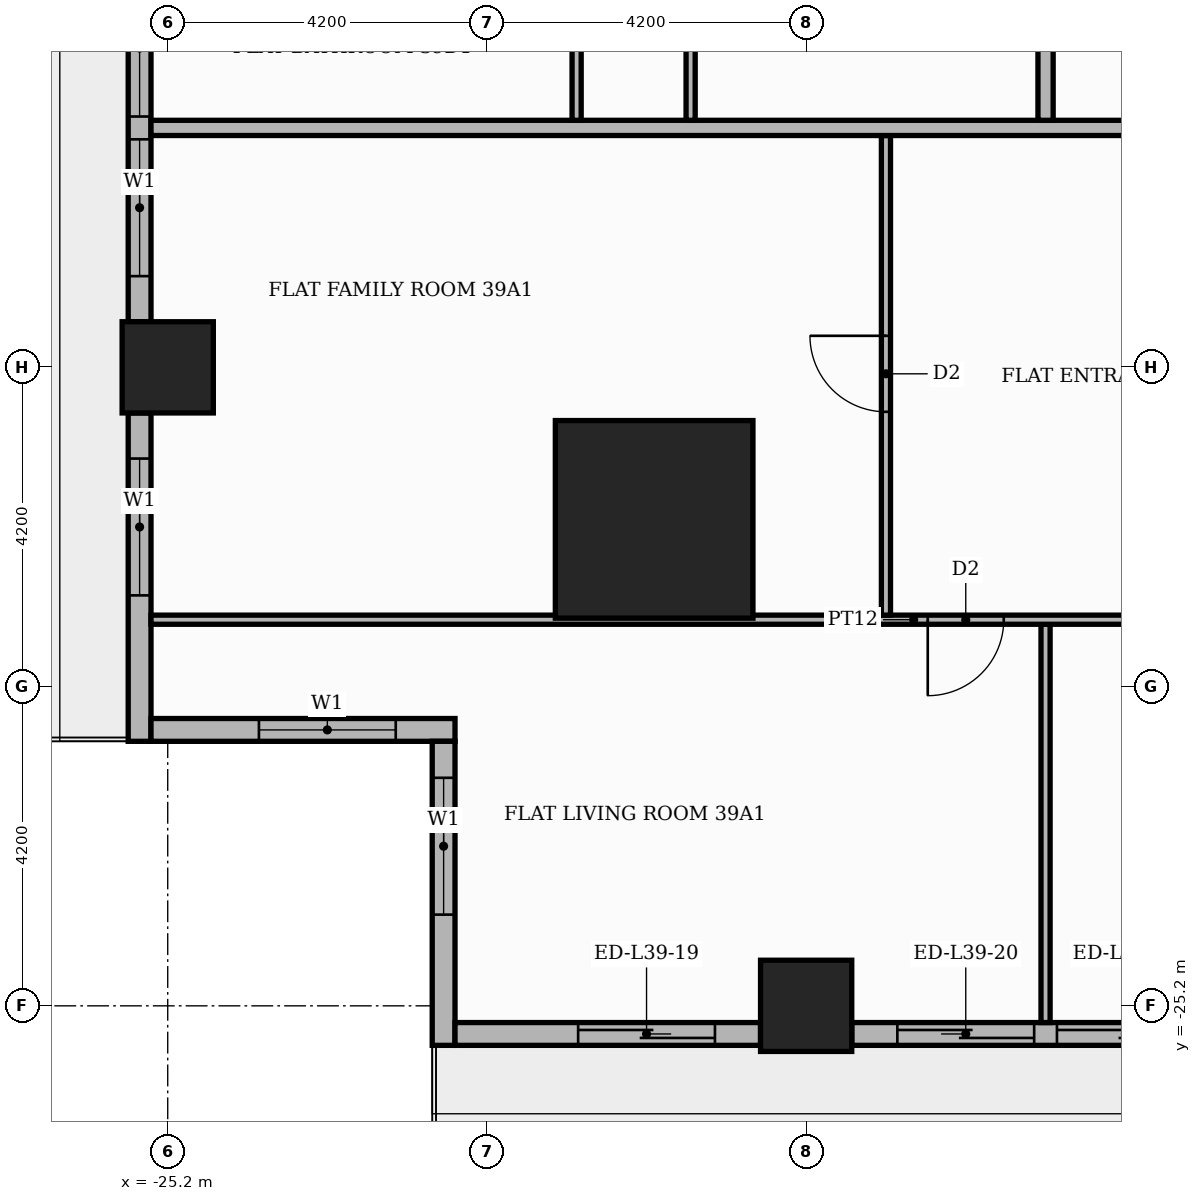
"""IFC4 building model, lengths in metres.
Left out: names, types, materials, properties, quantities, classifications, styles, units other than length and angle.
Written with IfcOpenShell. Run it as: python <this file> out.ifc"""

import sys

from ifc_helpers import new_model, si_unit, direction, frame, frame_2d, origin, origin_2d, place, context, subcontext, project, spatial, rectangle, extrude, element, fill, save


model = new_model("IFC4")
c1 = context("Model", 3, precision=1e-05, world=origin(), true_north=direction((0.0, 1.0)))
c2 = subcontext(c1, "Body", "Model", "MODEL_VIEW")
j1 = project(units=[si_unit("LENGTHUNIT", "METRE"), si_unit("PLANEANGLEUNIT", "RADIAN")], contexts=[c1])
p1 = place(None, origin())
s1 = spatial("IfcSite", under=j1, at=p1, CompositionType="ELEMENT")
p2 = place(p1, origin())
s2 = spatial("IfcBuilding", under=s1, at=p2, CompositionType="ELEMENT")
p3 = place(p2, frame((0.0, 0.0, 165.0)))
s3 = spatial("IfcBuildingStorey", under=s2, at=p3, CompositionType="ELEMENT", Elevation=165.0)
p4 = place(p3, frame((-18.8, -18.8, 0.0), z_axis=(0.0, 0.0, 1.0), x_axis=(1.0, 0.0, 0.0)))
e1 = element("IfcColumn", 1, at=p4, inside=s3, PredefinedType="COLUMN", context=c2, shape_type="SweptSolid", body=[
    extrude(rectangle(XDim=2.6, YDim=2.6, at=origin_2d()), origin(), (0.0, 0.0, 1.0), 3.9),
])
for number, where, z_axis, x_axis in (
    (2, (-16.8, -25.2, 0.0), (0.0, 0.0, 1.0), (1.0, 0.0, 0.0)),
    (3, (-25.2, -16.8, 0.0), (0.0, 0.0, 1.0), (1.0, 0.0, 0.0)),
):
    element("IfcColumn", number, at=place(p3, frame(where, z_axis=z_axis, x_axis=x_axis)), inside=s3, PredefinedType="COLUMN", context=c2, shape_type="SweptSolid", body=[
        extrude(rectangle(XDim=1.2, YDim=1.2, at=origin_2d()), origin(), (0.0, 0.0, 1.0), 3.9),
    ])
p5 = place(p3, frame((-25.57, -9.0, 0.0), z_axis=(0.0, 0.0, 1.0), x_axis=(0.0, -1.0, 0.0)))
e4 = element("IfcWall", 4, at=p5, inside=s3, PredefinedType="STANDARD", context=c2, shape_type="SweptSolid", body=[
    extrude(rectangle(XDim=7.2, YDim=0.3, at=frame_2d((3.6, 0.0))), origin(), (0.0, 0.0, 1.0), 3.48),
])
p6 = place(p5, frame((0.6, 0.0, 0.9)))
e5 = element("IfcOpeningElement", 5, at=p6, cuts=e4, PredefinedType="OPENING", context=c2, shape_type="SweptSolid", body=[
    extrude(rectangle(XDim=1.8, YDim=2.1, at=frame_2d((0.9, 1.05))), frame((0.0, 0.16, 0.0), z_axis=(0.0, -1.0, 0.0), x_axis=(1.0, 0.0, 0.0)), (0.0, 0.0, 1.0), 0.32),
])
p7 = place(p5, frame((2.7, 0.0, 0.9)))
e6 = element("IfcOpeningElement", 6, at=p7, cuts=e4, PredefinedType="OPENING", context=c2, shape_type="SweptSolid", body=[
    extrude(rectangle(XDim=1.8, YDim=2.1, at=frame_2d((0.9, 1.05))), frame((0.0, 0.16, 0.0), z_axis=(0.0, -1.0, 0.0), x_axis=(1.0, 0.0, 0.0)), (0.0, 0.0, 1.0), 0.32),
])
p8 = place(p5, frame((4.8, 0.0, 0.9)))
e7 = element("IfcOpeningElement", 7, at=p8, cuts=e4, PredefinedType="OPENING", context=c2, shape_type="SweptSolid", body=[
    extrude(rectangle(XDim=1.8, YDim=2.1, at=frame_2d((0.9, 1.05))), frame((0.0, 0.16, 0.0), z_axis=(0.0, -1.0, 0.0), x_axis=(1.0, 0.0, 0.0)), (0.0, 0.0, 1.0), 0.32),
])
p9 = place(p3, frame((-25.57, -17.4, 0.0), z_axis=(0.0, 0.0, 1.0), x_axis=(0.0, -1.0, 0.0)))
e8 = element("IfcWall", 8, at=p9, inside=s3, PredefinedType="STANDARD", context=c2, shape_type="SweptSolid", body=[
    extrude(rectangle(XDim=4.32, YDim=0.3, at=frame_2d((2.16, 0.0))), origin(), (0.0, 0.0, 1.0), 3.48),
])
p10 = place(p9, frame((0.6, 0.0, 0.9)))
e9 = element("IfcOpeningElement", 9, at=p10, cuts=e8, PredefinedType="OPENING", context=c2, shape_type="SweptSolid", body=[
    extrude(rectangle(XDim=1.8, YDim=2.1, at=frame_2d((0.9, 1.05))), frame((0.0, 0.16, 0.0), z_axis=(0.0, -1.0, 0.0), x_axis=(1.0, 0.0, 0.0)), (0.0, 0.0, 1.0), 0.32),
])
p11 = place(p3, frame((-25.42, -21.57, 0.0), z_axis=(0.0, 0.0, 1.0), x_axis=(1.0, 0.0, 0.0)))
e10 = element("IfcWall", 10, at=p11, inside=s3, PredefinedType="STANDARD", context=c2, shape_type="SweptSolid", body=[
    extrude(rectangle(XDim=4.0, YDim=0.3, at=frame_2d((2.0, 0.0))), origin(), (0.0, 0.0, 1.0), 3.48),
])
p12 = place(p11, frame((1.42, 0.0, 0.9)))
e11 = element("IfcOpeningElement", 11, at=p12, cuts=e10, PredefinedType="OPENING", context=c2, shape_type="SweptSolid", body=[
    extrude(rectangle(XDim=1.8, YDim=2.1, at=frame_2d((0.9, 1.05))), frame((0.0, 0.16, 0.0), z_axis=(0.0, -1.0, 0.0), x_axis=(1.0, 0.0, 0.0)), (0.0, 0.0, 1.0), 0.32),
])
p13 = place(p3, frame((-21.57, -21.72, 0.0), z_axis=(0.0, 0.0, 1.0), x_axis=(0.0, -1.0, 0.0)))
e12 = element("IfcWall", 12, at=p13, inside=s3, PredefinedType="STANDARD", context=c2, shape_type="SweptSolid", body=[
    extrude(rectangle(XDim=4.0, YDim=0.3, at=frame_2d((2.0, 0.0))), origin(), (0.0, 0.0, 1.0), 3.48),
])
p14 = place(p13, frame((0.48, 0.0, 0.9)))
e13 = element("IfcOpeningElement", 13, at=p14, cuts=e12, PredefinedType="OPENING", context=c2, shape_type="SweptSolid", body=[
    extrude(rectangle(XDim=1.8, YDim=2.1, at=frame_2d((0.9, 1.05))), frame((0.0, 0.16, 0.0), z_axis=(0.0, -1.0, 0.0), x_axis=(1.0, 0.0, 0.0)), (0.0, 0.0, 1.0), 0.32),
])
p15 = place(p3, frame((-21.42, -25.57, 0.0), z_axis=(0.0, 0.0, 1.0), x_axis=(1.0, 0.0, 0.0)))
e14 = element("IfcWall", 14, at=p15, inside=s3, PredefinedType="STANDARD", context=c2, shape_type="SweptSolid", body=[
    extrude(rectangle(XDim=4.02, YDim=0.3, at=frame_2d((2.01, 0.0))), origin(), (0.0, 0.0, 1.0), 3.48),
])
p16 = place(p15, frame((1.62, 0.0, 0.0)))
e15 = element("IfcOpeningElement", 15, at=p16, cuts=e14, PredefinedType="OPENING", context=c2, shape_type="SweptSolid", body=[
    extrude(rectangle(XDim=1.8, YDim=2.4, at=frame_2d((0.9, 1.2))), frame((0.0, 0.16, 0.0), z_axis=(0.0, -1.0, 0.0), x_axis=(1.0, 0.0, 0.0)), (0.0, 0.0, 1.0), 0.32),
])
p17 = place(p3, frame((-16.2, -25.57, 0.0), z_axis=(0.0, 0.0, 1.0), x_axis=(1.0, 0.0, 0.0)))
e16 = element("IfcWall", 16, at=p17, inside=s3, PredefinedType="STANDARD", context=c2, shape_type="SweptSolid", body=[
    extrude(rectangle(XDim=7.2, YDim=0.3, at=frame_2d((3.6, 0.0))), origin(), (0.0, 0.0, 1.0), 3.48),
])
p18 = place(p17, frame((0.6, 0.0, 0.0)))
e17 = element("IfcOpeningElement", 17, at=p18, cuts=e16, PredefinedType="OPENING", context=c2, shape_type="SweptSolid", body=[
    extrude(rectangle(XDim=1.8, YDim=2.4, at=frame_2d((0.9, 1.2))), frame((0.0, 0.16, 0.0), z_axis=(0.0, -1.0, 0.0), x_axis=(1.0, 0.0, 0.0)), (0.0, 0.0, 1.0), 0.32),
])
p19 = place(p17, frame((2.7, 0.0, 0.0)))
e18 = element("IfcOpeningElement", 18, at=p19, cuts=e16, PredefinedType="OPENING", context=c2, shape_type="SweptSolid", body=[
    extrude(rectangle(XDim=1.8, YDim=2.4, at=frame_2d((0.9, 1.2))), frame((0.0, 0.16, 0.0), z_axis=(0.0, -1.0, 0.0), x_axis=(1.0, 0.0, 0.0)), (0.0, 0.0, 1.0), 0.32),
])
p20 = place(p17, frame((4.8, 0.0, 0.9)))
e19 = element("IfcOpeningElement", 19, at=p20, cuts=e16, PredefinedType="OPENING", context=c2, shape_type="SweptSolid", body=[
    extrude(rectangle(XDim=1.8, YDim=2.1, at=frame_2d((0.9, 1.05))), frame((0.0, 0.16, 0.0), z_axis=(0.0, -1.0, 0.0), x_axis=(1.0, 0.0, 0.0)), (0.0, 0.0, 1.0), 0.32),
])
p21 = place(p3, frame((-13.65, -25.42, 0.0), z_axis=(0.0, 0.0, 1.0), x_axis=(0.0, 1.0, 0.0)))
e20 = element("IfcWall", 20, at=p21, inside=s3, PredefinedType="PARTITIONING", context=c2, shape_type="SweptSolid", body=[
    extrude(rectangle(XDim=5.24, YDim=0.12, at=frame_2d((2.62, 0.0))), origin(), (0.0, 0.0, 1.0), 3.48),
])
p22 = place(p3, frame((-25.42, -20.12, 0.0), z_axis=(0.0, 0.0, 1.0), x_axis=(1.0, 0.0, 0.0)))
e21 = element("IfcWall", 21, at=p22, inside=s3, PredefinedType="PARTITIONING", context=c2, shape_type="SweptSolid", body=[
    extrude(rectangle(XDim=20.07, YDim=0.12, at=frame_2d((10.035, 0.0))), origin(), (0.0, 0.0, 1.0), 3.48),
])
p23 = place(p22, frame((10.22, 0.0, 0.0)))
e22 = element("IfcOpeningElement", 22, at=p23, cuts=e21, PredefinedType="OPENING", context=c2, shape_type="SweptSolid", body=[
    extrude(rectangle(XDim=1.0, YDim=2.1, at=frame_2d((0.5, 1.05))), frame((0.0, 0.07, 0.0), z_axis=(0.0, -1.0, 0.0), x_axis=(1.0, 0.0, 0.0)), (0.0, 0.0, 1.0), 0.14),
])
p24 = place(p22, frame((13.42, 0.0, 0.0)))
e23 = element("IfcOpeningElement", 23, at=p24, cuts=e21, PredefinedType="OPENING", context=c2, shape_type="SweptSolid", body=[
    extrude(rectangle(XDim=0.9, YDim=2.1, at=frame_2d((0.45, 1.05))), frame((0.0, 0.07, 0.0), z_axis=(0.0, -1.0, 0.0), x_axis=(1.0, 0.0, 0.0)), (0.0, 0.0, 1.0), 0.14),
])
p25 = place(p3, frame((-15.75, -20.06, 0.0), z_axis=(0.0, 0.0, 1.0), x_axis=(0.0, 1.0, 0.0)))
e24 = element("IfcWall", 24, at=p25, inside=s3, PredefinedType="PARTITIONING", context=c2, shape_type="SweptSolid", body=[
    extrude(rectangle(XDim=6.31, YDim=0.12, at=frame_2d((3.155, 0.0))), origin(), (0.0, 0.0, 1.0), 3.48),
])
p26 = place(p25, frame((2.675, 0.0, 0.0)))
e25 = element("IfcOpeningElement", 25, at=p26, cuts=e24, PredefinedType="OPENING", context=c2, shape_type="SweptSolid", body=[
    extrude(rectangle(XDim=1.0, YDim=2.1, at=frame_2d((0.5, 1.05))), frame((0.0, 0.07, 0.0), z_axis=(0.0, -1.0, 0.0), x_axis=(1.0, 0.0, 0.0)), (0.0, 0.0, 1.0), 0.14),
])
p27 = place(p3, frame((-25.42, -13.65, 0.0), z_axis=(0.0, 0.0, 1.0), x_axis=(1.0, 0.0, 0.0)))
e26 = element("IfcWall", 26, at=p27, inside=s3, PredefinedType="PARTITIONING", context=c2, shape_type="SweptSolid", body=[
    extrude(rectangle(XDim=39.07, YDim=0.2, at=frame_2d((19.535, 0.0))), origin(), (0.0, 0.0, 1.0), 3.48),
])
p28 = place(p27, frame((13.32, 0.0, 0.0)))
e27 = element("IfcOpeningElement", 27, at=p28, cuts=e26, PredefinedType="OPENING", context=c2, shape_type="SweptSolid", body=[
    extrude(rectangle(XDim=1.1, YDim=2.4, at=frame_2d((0.55, 1.2))), frame((0.0, 0.11, 0.0), z_axis=(0.0, -1.0, 0.0), x_axis=(1.0, 0.0, 0.0)), (0.0, 0.0, 1.0), 0.22),
])
p29 = place(p27, frame((21.72, 0.0, 0.0)))
e28 = element("IfcOpeningElement", 28, at=p29, cuts=e26, PredefinedType="OPENING", context=c2, shape_type="SweptSolid", body=[
    extrude(rectangle(XDim=1.1, YDim=2.4, at=frame_2d((0.55, 1.2))), frame((0.0, 0.11, 0.0), z_axis=(0.0, -1.0, 0.0), x_axis=(1.0, 0.0, 0.0)), (0.0, 0.0, 1.0), 0.22),
])
p30 = place(p3, frame((-19.82, -13.55, 0.0), z_axis=(0.0, 0.0, 1.0), x_axis=(0.0, 1.0, 0.0)))
e29 = element("IfcWall", 29, at=p30, inside=s3, PredefinedType="PARTITIONING", context=c2, shape_type="SweptSolid", body=[
    extrude(rectangle(XDim=1.94, YDim=0.12, at=frame_2d((0.97, 0.0))), origin(), (0.0, 0.0, 1.0), 3.48),
])
p31 = place(p3, frame((-18.32, -13.55, 0.0), z_axis=(0.0, 0.0, 1.0), x_axis=(0.0, 1.0, 0.0)))
e30 = element("IfcWall", 30, at=p31, inside=s3, PredefinedType="PARTITIONING", context=c2, shape_type="SweptSolid", body=[
    extrude(rectangle(XDim=4.04, YDim=0.12, at=frame_2d((2.02, 0.0))), origin(), (0.0, 0.0, 1.0), 3.48),
])
p32 = place(p31, frame((1.55, 0.0, 0.0)))
e31 = element("IfcOpeningElement", 31, at=p32, cuts=e30, PredefinedType="OPENING", context=c2, shape_type="SweptSolid", body=[
    extrude(rectangle(XDim=0.9, YDim=2.1, at=frame_2d((0.45, 1.05))), frame((0.0, 0.07, 0.0), z_axis=(0.0, -1.0, 0.0), x_axis=(1.0, 0.0, 0.0)), (0.0, 0.0, 1.0), 0.14),
])
p33 = place(p3, frame((-13.65, -13.55, 0.0), z_axis=(0.0, 0.0, 1.0), x_axis=(0.0, 1.0, 0.0)))
e32 = element("IfcWall", 32, at=p33, inside=s3, PredefinedType="PARTITIONING", context=c2, shape_type="SweptSolid", body=[
    extrude(rectangle(XDim=2.45, YDim=0.2, at=frame_2d((1.225, 0.0))), origin(), (0.0, 0.0, 1.0), 3.48),
])
p34 = place(p7, origin())
e33 = element("IfcWindow", 33, at=p34, inside=s3, PartitioningType="SINGLE_PANEL", PredefinedType="WINDOW", context=c2, shape_type="SweptSolid", body=[
    extrude(rectangle(XDim=1.8, YDim=2.1, at=frame_2d((0.9, 1.05))), frame((0.0, 0.03, 0.0), z_axis=(0.0, -1.0, 0.0), x_axis=(1.0, 0.0, 0.0)), (0.0, 0.0, 1.0), 0.06),
])
fill(e6, e33)
p35 = place(p8, origin())
e34 = element("IfcWindow", 34, at=p35, inside=s3, PartitioningType="SINGLE_PANEL", PredefinedType="WINDOW", context=c2, shape_type="SweptSolid", body=[
    extrude(rectangle(XDim=1.8, YDim=2.1, at=frame_2d((0.9, 1.05))), frame((0.0, 0.03, 0.0), z_axis=(0.0, -1.0, 0.0), x_axis=(1.0, 0.0, 0.0)), (0.0, 0.0, 1.0), 0.06),
])
fill(e7, e34)
p36 = place(p10, origin())
e35 = element("IfcWindow", 35, at=p36, inside=s3, PartitioningType="SINGLE_PANEL", PredefinedType="WINDOW", context=c2, shape_type="SweptSolid", body=[
    extrude(rectangle(XDim=1.8, YDim=2.1, at=frame_2d((0.9, 1.05))), frame((0.0, 0.03, 0.0), z_axis=(0.0, -1.0, 0.0), x_axis=(1.0, 0.0, 0.0)), (0.0, 0.0, 1.0), 0.06),
])
fill(e9, e35)
p37 = place(p12, origin())
e36 = element("IfcWindow", 36, at=p37, inside=s3, PartitioningType="SINGLE_PANEL", PredefinedType="WINDOW", context=c2, shape_type="SweptSolid", body=[
    extrude(rectangle(XDim=1.8, YDim=2.1, at=frame_2d((0.9, 1.05))), frame((0.0, 0.03, 0.0), z_axis=(0.0, -1.0, 0.0), x_axis=(1.0, 0.0, 0.0)), (0.0, 0.0, 1.0), 0.06),
])
fill(e11, e36)
p38 = place(p14, origin())
e37 = element("IfcWindow", 37, at=p38, inside=s3, PartitioningType="SINGLE_PANEL", PredefinedType="WINDOW", context=c2, shape_type="SweptSolid", body=[
    extrude(rectangle(XDim=1.8, YDim=2.1, at=frame_2d((0.9, 1.05))), frame((0.0, 0.03, 0.0), z_axis=(0.0, -1.0, 0.0), x_axis=(1.0, 0.0, 0.0)), (0.0, 0.0, 1.0), 0.06),
])
fill(e13, e37)
p39 = place(p16, origin())
e38 = element("IfcDoor", 38, at=p39, inside=s3, OperationType="SLIDING_TO_RIGHT", PredefinedType="DOOR", context=c2, shape_type="SweptSolid", body=[
    extrude(rectangle(XDim=1.8, YDim=2.4, at=frame_2d((0.9, 1.2))), frame((0.0, 0.025, 0.0), z_axis=(0.0, -1.0, 0.0), x_axis=(1.0, 0.0, 0.0)), (0.0, 0.0, 1.0), 0.05),
])
fill(e15, e38)
p40 = place(p18, origin())
e39 = element("IfcDoor", 39, at=p40, inside=s3, OperationType="SLIDING_TO_LEFT", PredefinedType="DOOR", context=c2, shape_type="SweptSolid", body=[
    extrude(rectangle(XDim=1.8, YDim=2.4, at=frame_2d((0.9, 1.2))), frame((0.0, 0.025, 0.0), z_axis=(0.0, -1.0, 0.0), x_axis=(1.0, 0.0, 0.0)), (0.0, 0.0, 1.0), 0.05),
])
fill(e17, e39)
p41 = place(p19, origin())
e40 = element("IfcDoor", 40, at=p41, inside=s3, OperationType="SLIDING_TO_RIGHT", PredefinedType="DOOR", context=c2, shape_type="SweptSolid", body=[
    extrude(rectangle(XDim=1.8, YDim=2.4, at=frame_2d((0.9, 1.2))), frame((0.0, 0.025, 0.0), z_axis=(0.0, -1.0, 0.0), x_axis=(1.0, 0.0, 0.0)), (0.0, 0.0, 1.0), 0.05),
])
fill(e18, e40)
p42 = place(p26, origin())
e41 = element("IfcDoor", 41, at=p42, inside=s3, OperationType="SINGLE_SWING_RIGHT", PredefinedType="DOOR", context=c2, shape_type="SweptSolid", body=[
    extrude(rectangle(XDim=1.0, YDim=2.1, at=frame_2d((0.5, 1.05))), frame((0.0, 0.025, 0.0), z_axis=(0.0, -1.0, 0.0), x_axis=(1.0, 0.0, 0.0)), (0.0, 0.0, 1.0), 0.05),
])
fill(e25, e41)
p43 = place(p23, frame((1.0, 0.0, 0.0), z_axis=(0.0, 0.0, 1.0), x_axis=(-1.0, 0.0, 0.0)))
e42 = element("IfcDoor", 42, at=p43, inside=s3, OperationType="SINGLE_SWING_LEFT", PredefinedType="DOOR", context=c2, shape_type="SweptSolid", body=[
    extrude(rectangle(XDim=1.0, YDim=2.1, at=frame_2d((0.5, 1.05))), frame((0.0, 0.025, 0.0), z_axis=(0.0, -1.0, 0.0), x_axis=(1.0, 0.0, 0.0)), (0.0, 0.0, 1.0), 0.05),
])
fill(e22, e42)
save(model, sys.argv[1])
